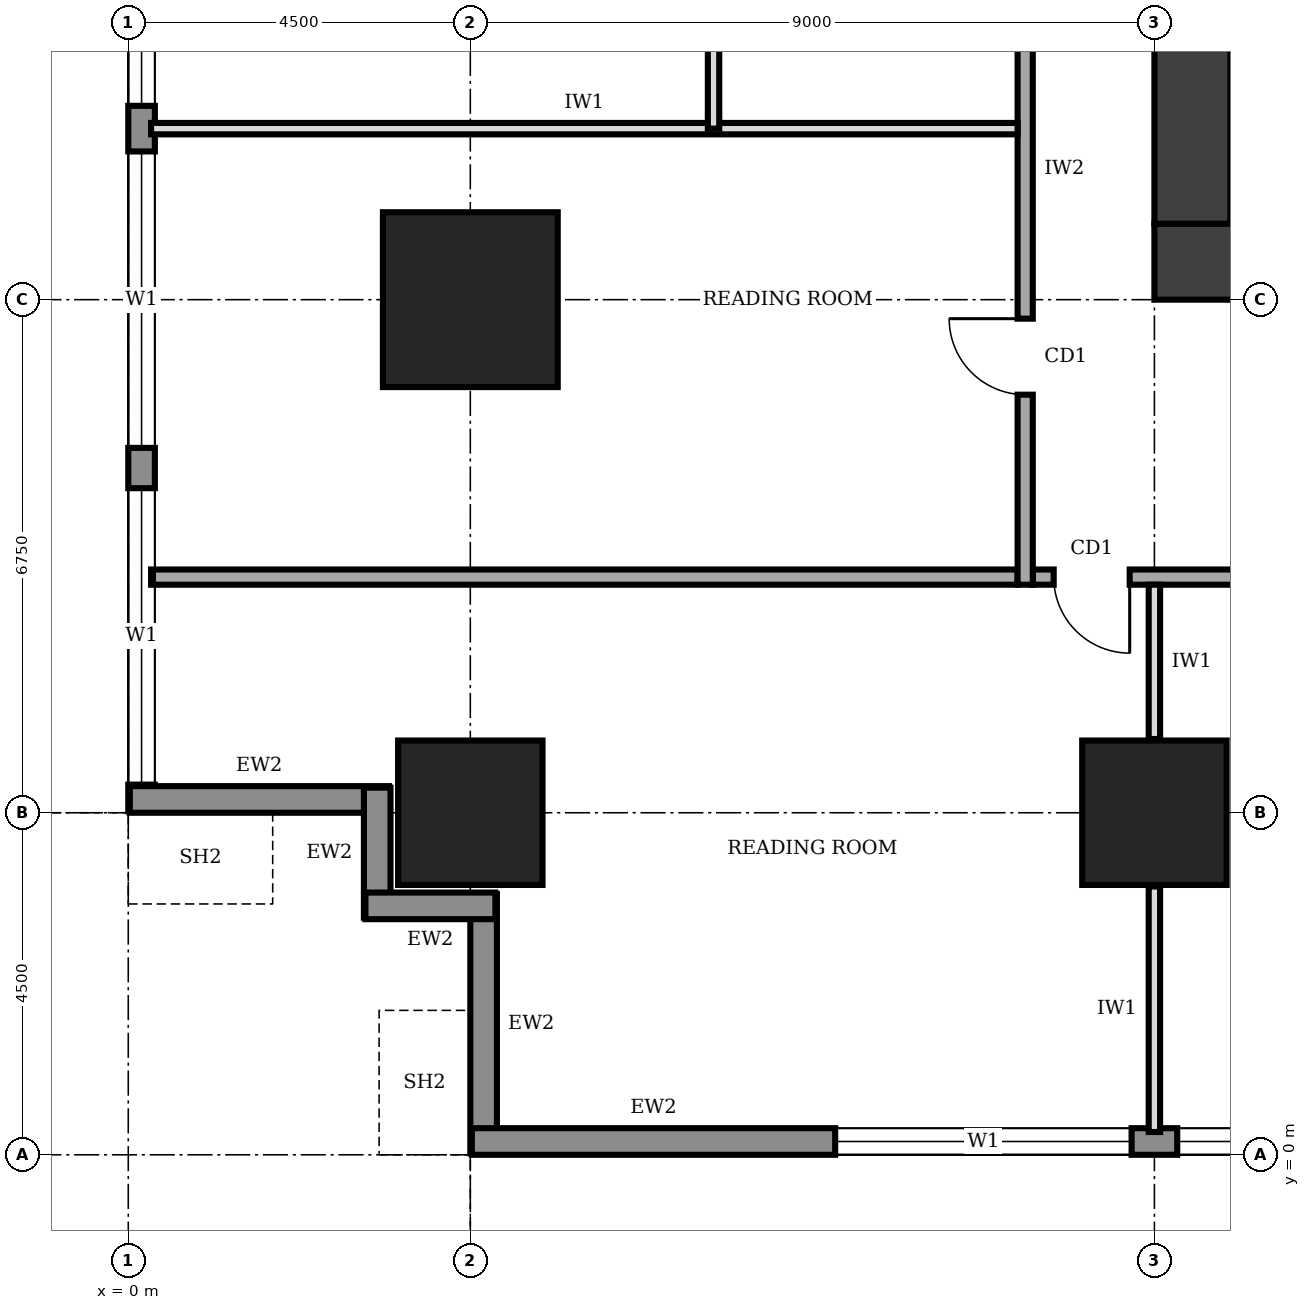
"""IFC4 building model, lengths in metres.
Left out: names, types, materials, properties, quantities, classifications, styles, units other than length and angle.
Written with IfcOpenShell. Run it as: python <this file> out.ifc"""

import sys

from ifc_helpers import new_model, si_unit, direction, frame, frame_2d, origin, origin_2d, place, context, subcontext, project, spatial, rectangle, extrude, element, fill, save


model = new_model("IFC4")
c1 = context("Model", 3, precision=1e-05, world=origin(), true_north=direction((0.0, 1.0)))
c2 = subcontext(c1, "Body", "Model", "MODEL_VIEW")
j1 = project(units=[si_unit("LENGTHUNIT", "METRE"), si_unit("PLANEANGLEUNIT", "RADIAN")], contexts=[c1])
p1 = place(None, origin())
s1 = spatial("IfcSite", under=j1, at=p1, CompositionType="ELEMENT")
p2 = place(p1, origin())
s2 = spatial("IfcBuilding", under=s1, at=p2, CompositionType="ELEMENT")
p3 = place(p2, frame((0.0, 0.0, 133.0)))
s3 = spatial("IfcBuildingStorey", under=s2, at=p3, CompositionType="ELEMENT", Elevation=133.0)
p4 = place(p3, frame((13.5, 11.75, 0.0), z_axis=(0.0, 0.0, 1.0), x_axis=(1.0, 0.0, 0.0)))
e1 = element("IfcWall", 1, at=p4, inside=s3, PredefinedType="SHEAR", context=c2, shape_type="SweptSolid", body=[
    extrude(rectangle(XDim=13.5, YDim=1.0, at=frame_2d((6.75, 0.0))), origin(), (0.0, 0.0, 1.0), 4.0),
])
p5 = place(p4, frame((4.75, 0.0, 0.0)))
e2 = element("IfcOpeningElement", 2, at=p5, cuts=e1, PredefinedType="OPENING", context=c2, shape_type="SweptSolid", body=[
    extrude(rectangle(XDim=1.0, YDim=2.1, at=frame_2d((0.5, 1.05))), frame((0.0, 0.51, 0.0), z_axis=(0.0, -1.0, 0.0), x_axis=(1.0, 0.0, 0.0)), (0.0, 0.0, 1.0), 1.02),
])
p6 = place(p3, frame((14.0, 28.25, 0.0), z_axis=(0.0, 0.0, 1.0), x_axis=(0.0, -1.0, 0.0)))
e3 = element("IfcWall", 3, at=p6, inside=s3, PredefinedType="SHEAR", context=c2, shape_type="SweptSolid", body=[
    extrude(rectangle(XDim=16.0, YDim=1.0, at=frame_2d((8.0, 0.0))), origin(), (0.0, 0.0, 1.0), 4.0),
])
for number, where, z_axis, x_axis in (
    (4, (4.5, 4.5, 0.0), (0.0, 0.0, 1.0), (1.0, 0.0, 0.0)),
    (5, (13.5, 4.5, 0.0), (0.0, 0.0, 1.0), (1.0, 0.0, 0.0)),
):
    element("IfcColumn", number, at=place(p3, frame(where, z_axis=z_axis, x_axis=x_axis)), inside=s3, PredefinedType="COLUMN", context=c2, shape_type="SweptSolid", body=[
        extrude(rectangle(XDim=1.9, YDim=1.9, at=origin_2d()), origin(), (0.0, 0.0, 1.0), 4.0),
    ])
p7 = place(p3, frame((4.5, 11.25, 0.0), z_axis=(0.0, 0.0, 1.0), x_axis=(1.0, 0.0, 0.0)))
e6 = element("IfcColumn", 6, at=p7, inside=s3, PredefinedType="COLUMN", context=c2, shape_type="SweptSolid", body=[
    extrude(rectangle(XDim=2.3, YDim=2.3, at=origin_2d()), origin(), (0.0, 0.0, 1.0), 4.0),
])
p8 = place(p3, frame((4.675, 3.43, 0.0), z_axis=(0.0, 0.0, 1.0), x_axis=(0.0, -1.0, 0.0)))
e7 = element("IfcWall", 7, at=p8, inside=s3, PredefinedType="STANDARD", context=c2, shape_type="SweptSolid", body=[
    extrude(rectangle(XDim=3.41, YDim=0.35, at=frame_2d((1.705, 0.0))), origin(), (0.0, 0.0, 1.0), 2.85),
])
p9 = place(p3, frame((4.52, 0.175, 0.0), z_axis=(0.0, 0.0, 1.0), x_axis=(1.0, 0.0, 0.0)))
e8 = element("IfcWall", 8, at=p9, inside=s3, PredefinedType="STANDARD", context=c2, shape_type="SweptSolid", body=[
    extrude(rectangle(XDim=31.46, YDim=0.35, at=frame_2d((15.73, 0.0))), origin(), (0.0, 0.0, 1.0), 3.75),
])
p10 = place(p9, frame((4.78, 0.0, 0.9)))
e9 = element("IfcOpeningElement", 9, at=p10, cuts=e8, PredefinedType="OPENING", context=c2, shape_type="SweptSolid", body=[
    extrude(rectangle(XDim=3.9, YDim=2.2, at=frame_2d((1.95, 1.1))), frame((0.0, 0.185, 0.0), z_axis=(0.0, -1.0, 0.0), x_axis=(1.0, 0.0, 0.0)), (0.0, 0.0, 1.0), 0.37),
])
p11 = place(p9, frame((9.28, 0.0, 0.9)))
e10 = element("IfcOpeningElement", 10, at=p11, cuts=e8, PredefinedType="OPENING", context=c2, shape_type="SweptSolid", body=[
    extrude(rectangle(XDim=3.9, YDim=2.2, at=frame_2d((1.95, 1.1))), frame((0.0, 0.185, 0.0), z_axis=(0.0, -1.0, 0.0), x_axis=(1.0, 0.0, 0.0)), (0.0, 0.0, 1.0), 0.37),
])
p12 = place(p9, frame((13.78, 0.0, 0.9)))
e11 = element("IfcOpeningElement", 11, at=p12, cuts=e8, PredefinedType="OPENING", context=c2, shape_type="SweptSolid", body=[
    extrude(rectangle(XDim=3.9, YDim=2.2, at=frame_2d((1.95, 1.1))), frame((0.0, 0.185, 0.0), z_axis=(0.0, -1.0, 0.0), x_axis=(1.0, 0.0, 0.0)), (0.0, 0.0, 1.0), 0.37),
])
p13 = place(p9, frame((18.28, 0.0, 0.9)))
e12 = element("IfcOpeningElement", 12, at=p13, cuts=e8, PredefinedType="OPENING", context=c2, shape_type="SweptSolid", body=[
    extrude(rectangle(XDim=3.9, YDim=2.2, at=frame_2d((1.95, 1.1))), frame((0.0, 0.185, 0.0), z_axis=(0.0, -1.0, 0.0), x_axis=(1.0, 0.0, 0.0)), (0.0, 0.0, 1.0), 0.37),
])
p14 = place(p9, frame((22.78, 0.0, 0.9)))
e13 = element("IfcOpeningElement", 13, at=p14, cuts=e8, PredefinedType="OPENING", context=c2, shape_type="SweptSolid", body=[
    extrude(rectangle(XDim=3.9, YDim=2.2, at=frame_2d((1.95, 1.1))), frame((0.0, 0.185, 0.0), z_axis=(0.0, -1.0, 0.0), x_axis=(1.0, 0.0, 0.0)), (0.0, 0.0, 1.0), 0.37),
])
p15 = place(p9, frame((27.21, 0.0, 0.9)))
e14 = element("IfcOpeningElement", 14, at=p15, cuts=e8, PredefinedType="OPENING", context=c2, shape_type="SweptSolid", body=[
    extrude(rectangle(XDim=3.9, YDim=2.2, at=frame_2d((1.95, 1.1))), frame((0.0, 0.185, 0.0), z_axis=(0.0, -1.0, 0.0), x_axis=(1.0, 0.0, 0.0)), (0.0, 0.0, 1.0), 0.37),
])
p16 = place(p3, frame((0.175, 35.98, 0.0), z_axis=(0.0, 0.0, 1.0), x_axis=(0.0, -1.0, 0.0)))
e15 = element("IfcWall", 15, at=p16, inside=s3, PredefinedType="STANDARD", context=c2, shape_type="SweptSolid", body=[
    extrude(rectangle(XDim=31.46, YDim=0.35, at=frame_2d((15.73, 0.0))), origin(), (0.0, 0.0, 1.0), 3.75),
])
p17 = place(p16, frame((27.21, 0.0, 0.9)))
e16 = element("IfcOpeningElement", 16, at=p17, cuts=e15, PredefinedType="OPENING", context=c2, shape_type="SweptSolid", body=[
    extrude(rectangle(XDim=3.9, YDim=2.2, at=frame_2d((1.95, 1.1))), frame((0.0, 0.185, 0.0), z_axis=(0.0, -1.0, 0.0), x_axis=(1.0, 0.0, 0.0)), (0.0, 0.0, 1.0), 0.37),
])
p18 = place(p16, frame((22.78, 0.0, 0.9)))
e17 = element("IfcOpeningElement", 17, at=p18, cuts=e15, PredefinedType="OPENING", context=c2, shape_type="SweptSolid", body=[
    extrude(rectangle(XDim=3.9, YDim=2.2, at=frame_2d((1.95, 1.1))), frame((0.0, 0.185, 0.0), z_axis=(0.0, -1.0, 0.0), x_axis=(1.0, 0.0, 0.0)), (0.0, 0.0, 1.0), 0.37),
])
p19 = place(p16, frame((18.28, 0.0, 0.9)))
e18 = element("IfcOpeningElement", 18, at=p19, cuts=e15, PredefinedType="OPENING", context=c2, shape_type="SweptSolid", body=[
    extrude(rectangle(XDim=3.9, YDim=2.2, at=frame_2d((1.95, 1.1))), frame((0.0, 0.185, 0.0), z_axis=(0.0, -1.0, 0.0), x_axis=(1.0, 0.0, 0.0)), (0.0, 0.0, 1.0), 0.37),
])
p20 = place(p16, frame((13.78, 0.0, 0.9)))
e19 = element("IfcOpeningElement", 19, at=p20, cuts=e15, PredefinedType="OPENING", context=c2, shape_type="SweptSolid", body=[
    extrude(rectangle(XDim=3.9, YDim=2.2, at=frame_2d((1.95, 1.1))), frame((0.0, 0.185, 0.0), z_axis=(0.0, -1.0, 0.0), x_axis=(1.0, 0.0, 0.0)), (0.0, 0.0, 1.0), 0.37),
])
p21 = place(p16, frame((9.28, 0.0, 0.9)))
e20 = element("IfcOpeningElement", 20, at=p21, cuts=e15, PredefinedType="OPENING", context=c2, shape_type="SweptSolid", body=[
    extrude(rectangle(XDim=3.9, YDim=2.2, at=frame_2d((1.95, 1.1))), frame((0.0, 0.185, 0.0), z_axis=(0.0, -1.0, 0.0), x_axis=(1.0, 0.0, 0.0)), (0.0, 0.0, 1.0), 0.37),
])
p22 = place(p16, frame((4.78, 0.0, 0.9)))
e21 = element("IfcOpeningElement", 21, at=p22, cuts=e15, PredefinedType="OPENING", context=c2, shape_type="SweptSolid", body=[
    extrude(rectangle(XDim=3.9, YDim=2.2, at=frame_2d((1.95, 1.1))), frame((0.0, 0.185, 0.0), z_axis=(0.0, -1.0, 0.0), x_axis=(1.0, 0.0, 0.0)), (0.0, 0.0, 1.0), 0.37),
])
p23 = place(p3, frame((0.02, 4.675, 0.0), z_axis=(0.0, 0.0, 1.0), x_axis=(1.0, 0.0, 0.0)))
e22 = element("IfcWall", 22, at=p23, inside=s3, PredefinedType="STANDARD", context=c2, shape_type="SweptSolid", body=[
    extrude(rectangle(XDim=3.41, YDim=0.35, at=frame_2d((1.705, 0.0))), origin(), (0.0, 0.0, 1.0), 2.85),
])
for number, where, z_axis, x_axis in (
    (23, (3.275, 4.83, 0.0), (0.0, 0.0, 1.0), (0.0, -1.0, 0.0)),
    (24, (3.12, 3.275, 0.0), (0.0, 0.0, 1.0), (1.0, 0.0, 0.0)),
):
    element("IfcWall", number, at=place(p3, frame(where, z_axis=z_axis, x_axis=x_axis)), inside=s3, PredefinedType="STANDARD", context=c2, shape_type="SweptSolid", body=[
        extrude(rectangle(XDim=1.71, YDim=0.35, at=frame_2d((0.855, 0.0))), origin(), (0.0, 0.0, 1.0), 3.75),
    ])
p24 = place(p3, frame((11.9, 7.6, 0.0), z_axis=(0.0, 0.0, 1.0), x_axis=(1.0, 0.0, 0.0)))
e25 = element("IfcWall", 25, at=p24, inside=s3, PredefinedType="SOLIDWALL", context=c2, shape_type="SweptSolid", body=[
    extrude(rectangle(XDim=16.9, YDim=0.2, at=frame_2d((8.45, 0.0))), origin(), (0.0, 0.0, 1.0), 3.75),
])
p25 = place(p24, frame((0.275, 0.0, 0.0)))
e26 = element("IfcOpeningElement", 26, at=p25, cuts=e25, PredefinedType="OPENING", context=c2, shape_type="SweptSolid", body=[
    extrude(rectangle(XDim=1.0, YDim=2.1, at=frame_2d((0.5, 1.05))), frame((0.0, 0.11, 0.0), z_axis=(0.0, -1.0, 0.0), x_axis=(1.0, 0.0, 0.0)), (0.0, 0.0, 1.0), 0.22),
])
p26 = place(p24, frame((3.35, 0.0, 0.0)))
e27 = element("IfcOpeningElement", 27, at=p26, cuts=e25, PredefinedType="OPENING", context=c2, shape_type="SweptSolid", body=[
    extrude(rectangle(XDim=1.0, YDim=2.1, at=frame_2d((0.5, 1.05))), frame((0.0, 0.11, 0.0), z_axis=(0.0, -1.0, 0.0), x_axis=(1.0, 0.0, 0.0)), (0.0, 0.0, 1.0), 0.22),
])
p27 = place(p24, frame((10.1, 0.0, 0.0)))
e28 = element("IfcOpeningElement", 28, at=p27, cuts=e25, PredefinedType="OPENING", context=c2, shape_type="SweptSolid", body=[
    extrude(rectangle(XDim=1.0, YDim=2.1, at=frame_2d((0.5, 1.05))), frame((0.0, 0.11, 0.0), z_axis=(0.0, -1.0, 0.0), x_axis=(1.0, 0.0, 0.0)), (0.0, 0.0, 1.0), 0.22),
])
p28 = place(p24, frame((15.425, 0.0, 0.0)))
e29 = element("IfcOpeningElement", 29, at=p28, cuts=e25, PredefinedType="OPENING", context=c2, shape_type="SweptSolid", body=[
    extrude(rectangle(XDim=1.0, YDim=2.1, at=frame_2d((0.5, 1.05))), frame((0.0, 0.11, 0.0), z_axis=(0.0, -1.0, 0.0), x_axis=(1.0, 0.0, 0.0)), (0.0, 0.0, 1.0), 0.22),
])
p29 = place(p3, frame((11.8, 31.3, 0.0), z_axis=(0.0, 0.0, 1.0), x_axis=(0.0, -1.0, 0.0)))
e30 = element("IfcWall", 30, at=p29, inside=s3, PredefinedType="SOLIDWALL", context=c2, shape_type="SweptSolid", body=[
    extrude(rectangle(XDim=23.8, YDim=0.2, at=frame_2d((11.9, 0.0))), origin(), (0.0, 0.0, 1.0), 3.75),
])
p30 = place(p29, frame((20.3, 0.0, 0.0)))
e31 = element("IfcOpeningElement", 31, at=p30, cuts=e30, PredefinedType="OPENING", context=c2, shape_type="SweptSolid", body=[
    extrude(rectangle(XDim=1.0, YDim=2.1, at=frame_2d((0.5, 1.05))), frame((0.0, 0.11, 0.0), z_axis=(0.0, -1.0, 0.0), x_axis=(1.0, 0.0, 0.0)), (0.0, 0.0, 1.0), 0.22),
])
p31 = place(p29, frame((15.45, 0.0, 0.0)))
e32 = element("IfcOpeningElement", 32, at=p31, cuts=e30, PredefinedType="OPENING", context=c2, shape_type="SweptSolid", body=[
    extrude(rectangle(XDim=0.9, YDim=2.1, at=frame_2d((0.45, 1.05))), frame((0.0, 0.11, 0.0), z_axis=(0.0, -1.0, 0.0), x_axis=(1.0, 0.0, 0.0)), (0.0, 0.0, 1.0), 0.22),
])
p32 = place(p29, frame((12.45, 0.0, 0.0)))
e33 = element("IfcOpeningElement", 33, at=p32, cuts=e30, PredefinedType="OPENING", context=c2, shape_type="SweptSolid", body=[
    extrude(rectangle(XDim=0.9, YDim=2.1, at=frame_2d((0.45, 1.05))), frame((0.0, 0.11, 0.0), z_axis=(0.0, -1.0, 0.0), x_axis=(1.0, 0.0, 0.0)), (0.0, 0.0, 1.0), 0.22),
])
p33 = place(p29, frame((7.6, 0.0, 0.0)))
e34 = element("IfcOpeningElement", 34, at=p33, cuts=e30, PredefinedType="OPENING", context=c2, shape_type="SweptSolid", body=[
    extrude(rectangle(XDim=0.9, YDim=2.1, at=frame_2d((0.45, 1.05))), frame((0.0, 0.11, 0.0), z_axis=(0.0, -1.0, 0.0), x_axis=(1.0, 0.0, 0.0)), (0.0, 0.0, 1.0), 0.22),
])
p34 = place(p29, frame((4.8, 0.0, 0.0)))
e35 = element("IfcOpeningElement", 35, at=p34, cuts=e30, PredefinedType="OPENING", context=c2, shape_type="SweptSolid", body=[
    extrude(rectangle(XDim=1.0, YDim=2.1, at=frame_2d((0.5, 1.05))), frame((0.0, 0.11, 0.0), z_axis=(0.0, -1.0, 0.0), x_axis=(1.0, 0.0, 0.0)), (0.0, 0.0, 1.0), 0.22),
])
p35 = place(p29, frame((10.3, 0.0, 0.0)))
e36 = element("IfcOpeningElement", 36, at=p35, cuts=e30, PredefinedType="OPENING", context=c2, shape_type="SweptSolid", body=[
    extrude(rectangle(XDim=1.0, YDim=2.1, at=frame_2d((0.5, 1.05))), frame((0.0, 0.11, 0.0), z_axis=(0.0, -1.0, 0.0), x_axis=(1.0, 0.0, 0.0)), (0.0, 0.0, 1.0), 0.22),
])
p36 = place(p29, frame((1.55, 0.0, 0.0)))
e37 = element("IfcOpeningElement", 37, at=p36, cuts=e30, PredefinedType="OPENING", context=c2, shape_type="SweptSolid", body=[
    extrude(rectangle(XDim=1.0, YDim=2.1, at=frame_2d((0.5, 1.05))), frame((0.0, 0.11, 0.0), z_axis=(0.0, -1.0, 0.0), x_axis=(1.0, 0.0, 0.0)), (0.0, 0.0, 1.0), 0.22),
])
p37 = place(p3, frame((0.3, 7.6, 0.0), z_axis=(0.0, 0.0, 1.0), x_axis=(1.0, 0.0, 0.0)))
e38 = element("IfcWall", 38, at=p37, inside=s3, PredefinedType="SOLIDWALL", context=c2, shape_type="SweptSolid", body=[
    extrude(rectangle(XDim=11.4, YDim=0.2, at=frame_2d((5.7, 0.0))), origin(), (0.0, 0.0, 1.0), 3.75),
])
p38 = place(p3, frame((13.5, 0.3, 0.0), z_axis=(0.0, 0.0, 1.0), x_axis=(0.0, 1.0, 0.0)))
e39 = element("IfcWall", 39, at=p38, inside=s3, PredefinedType="PARTITIONING", context=c2, shape_type="SweptSolid", body=[
    extrude(rectangle(XDim=3.23, YDim=0.15, at=frame_2d((1.615, 0.0))), origin(), (0.0, 0.0, 1.0), 2.85),
])
p39 = place(p3, frame((13.5, 5.47, 0.0), z_axis=(0.0, 0.0, 1.0), x_axis=(0.0, 1.0, 0.0)))
e40 = element("IfcWall", 40, at=p39, inside=s3, PredefinedType="PARTITIONING", context=c2, shape_type="SweptSolid", body=[
    extrude(rectangle(XDim=2.03, YDim=0.15, at=frame_2d((1.015, 0.0))), origin(), (0.0, 0.0, 1.0), 2.85),
])
p40 = place(p3, frame((0.3, 13.5, 0.0), z_axis=(0.0, 0.0, 1.0), x_axis=(1.0, 0.0, 0.0)))
e41 = element("IfcWall", 41, at=p40, inside=s3, PredefinedType="PARTITIONING", context=c2, shape_type="SweptSolid", body=[
    extrude(rectangle(XDim=11.4, YDim=0.15, at=frame_2d((5.7, 0.0))), origin(), (0.0, 0.0, 1.0), 3.75),
])
p41 = place(p3, frame((7.7, 13.5, 0.0), z_axis=(0.0, 0.0, 1.0), x_axis=(0.0, 1.0, 0.0)))
e42 = element("IfcWall", 42, at=p41, inside=s3, PredefinedType="PARTITIONING", context=c2, shape_type="SweptSolid", body=[
    extrude(rectangle(XDim=3.8, YDim=0.15, at=frame_2d((1.9, 0.0))), origin(), (0.0, 0.0, 1.0), 3.75),
])
p42 = place(p10, origin())
e43 = element("IfcWindow", 43, at=p42, inside=s3, PartitioningType="SINGLE_PANEL", PredefinedType="WINDOW", context=c2, shape_type="SweptSolid", body=[
    extrude(rectangle(XDim=3.9, YDim=2.2, at=frame_2d((1.95, 1.1))), frame((0.0, 0.03, 0.0), z_axis=(0.0, -1.0, 0.0), x_axis=(1.0, 0.0, 0.0)), (0.0, 0.0, 1.0), 0.06),
])
fill(e9, e43)
p43 = place(p11, origin())
e44 = element("IfcWindow", 44, at=p43, inside=s3, PartitioningType="SINGLE_PANEL", PredefinedType="WINDOW", context=c2, shape_type="SweptSolid", body=[
    extrude(rectangle(XDim=3.9, YDim=2.2, at=frame_2d((1.95, 1.1))), frame((0.0, 0.03, 0.0), z_axis=(0.0, -1.0, 0.0), x_axis=(1.0, 0.0, 0.0)), (0.0, 0.0, 1.0), 0.06),
])
fill(e10, e44)
p44 = place(p17, origin())
e45 = element("IfcWindow", 45, at=p44, inside=s3, PartitioningType="SINGLE_PANEL", PredefinedType="WINDOW", context=c2, shape_type="SweptSolid", body=[
    extrude(rectangle(XDim=3.9, YDim=2.2, at=frame_2d((1.95, 1.1))), frame((0.0, 0.03, 0.0), z_axis=(0.0, -1.0, 0.0), x_axis=(1.0, 0.0, 0.0)), (0.0, 0.0, 1.0), 0.06),
])
fill(e16, e45)
p45 = place(p18, origin())
e46 = element("IfcWindow", 46, at=p45, inside=s3, PartitioningType="SINGLE_PANEL", PredefinedType="WINDOW", context=c2, shape_type="SweptSolid", body=[
    extrude(rectangle(XDim=3.9, YDim=2.2, at=frame_2d((1.95, 1.1))), frame((0.0, 0.03, 0.0), z_axis=(0.0, -1.0, 0.0), x_axis=(1.0, 0.0, 0.0)), (0.0, 0.0, 1.0), 0.06),
])
fill(e17, e46)
p46 = place(p19, origin())
e47 = element("IfcWindow", 47, at=p46, inside=s3, PartitioningType="SINGLE_PANEL", PredefinedType="WINDOW", context=c2, shape_type="SweptSolid", body=[
    extrude(rectangle(XDim=3.9, YDim=2.2, at=frame_2d((1.95, 1.1))), frame((0.0, 0.03, 0.0), z_axis=(0.0, -1.0, 0.0), x_axis=(1.0, 0.0, 0.0)), (0.0, 0.0, 1.0), 0.06),
])
fill(e18, e47)
p47 = place(p25, frame((1.0, 0.0, 0.0), z_axis=(0.0, 0.0, 1.0), x_axis=(-1.0, 0.0, 0.0)))
e48 = element("IfcDoor", 48, at=p47, inside=s3, OperationType="SINGLE_SWING_LEFT", PredefinedType="DOOR", context=c2, shape_type="SweptSolid", body=[
    extrude(rectangle(XDim=1.0, YDim=2.1, at=frame_2d((0.5, 1.05))), frame((0.0, 0.025, 0.0), z_axis=(0.0, -1.0, 0.0), x_axis=(1.0, 0.0, 0.0)), (0.0, 0.0, 1.0), 0.05),
])
fill(e26, e48)
p48 = place(p30, frame((1.0, 0.0, 0.0), z_axis=(0.0, 0.0, 1.0), x_axis=(-1.0, 0.0, 0.0)))
e49 = element("IfcDoor", 49, at=p48, inside=s3, OperationType="SINGLE_SWING_RIGHT", PredefinedType="DOOR", context=c2, shape_type="SweptSolid", body=[
    extrude(rectangle(XDim=1.0, YDim=2.1, at=frame_2d((0.5, 1.05))), frame((0.0, 0.025, 0.0), z_axis=(0.0, -1.0, 0.0), x_axis=(1.0, 0.0, 0.0)), (0.0, 0.0, 1.0), 0.05),
])
fill(e31, e49)
save(model, sys.argv[1])
